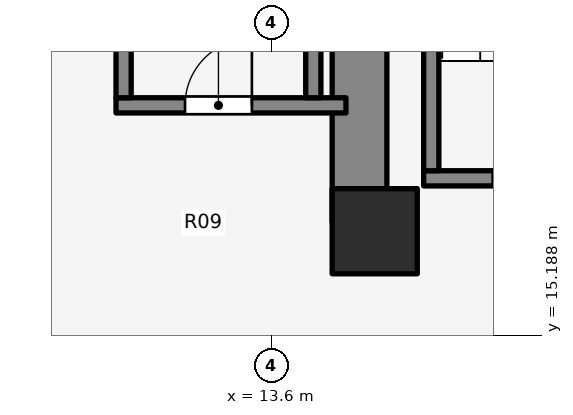
"""IFC4 building model, lengths in metres.
Left out: names, types, materials, properties, quantities, classifications, styles, units other than length and angle.
Written with IfcOpenShell. Run it as: python <this file> out.ifc"""

import sys

from ifc_helpers import new_model, si_unit, direction, frame, frame_2d, origin, origin_2d, place, context, subcontext, project, spatial, rectangle, extrude, element, fill, save


model = new_model("IFC4")
c1 = context("Model", 3, precision=1e-05, world=origin(), true_north=direction((0.0, 1.0)))
c2 = subcontext(c1, "Body", "Model", "MODEL_VIEW")
j1 = project(units=[si_unit("LENGTHUNIT", "METRE"), si_unit("PLANEANGLEUNIT", "RADIAN")], contexts=[c1])
p1 = place(None, origin())
s1 = spatial("IfcSite", under=j1, at=p1, CompositionType="ELEMENT")
p2 = place(p1, origin())
s2 = spatial("IfcBuilding", under=s1, at=p2, CompositionType="ELEMENT")
p3 = place(p2, frame((0.0, 0.0, 69.0)))
s3 = spatial("IfcBuildingStorey", under=s2, at=p3, CompositionType="ELEMENT", Elevation=69.0)
p4 = place(p3, frame((15.05, 17.05, 0.0), z_axis=(0.0, 0.0, 1.0), x_axis=(0.0, 1.0, 0.0)))
e1 = element("IfcWall", 1, at=p4, inside=s3, PredefinedType="SHEAR", context=c2, shape_type="SweptSolid", body=[
    extrude(rectangle(XDim=12.8, YDim=0.9, at=frame_2d((6.4, 0.0))), origin(), (0.0, 0.0, 1.0), 4.2),
])
p5 = place(p3, frame((16.105, 17.77, 0.0), z_axis=(0.0, 0.0, 1.0), x_axis=(1.0, 0.0, 0.0)))
e2 = element("IfcWall", 2, at=p5, inside=s3, PredefinedType="SOLIDWALL", context=c2, shape_type="SweptSolid", body=[
    extrude(rectangle(XDim=3.37, YDim=0.25, at=frame_2d((1.685, 0.0))), origin(), (0.0, 0.0, 1.0), 4.2),
])
p6 = place(p5, frame((1.135, 0.0, 0.0)))
e3 = element("IfcOpeningElement", 3, at=p6, cuts=e2, PredefinedType="OPENING", context=c2, shape_type="SweptSolid", body=[
    extrude(rectangle(XDim=1.1, YDim=2.1, at=frame_2d((0.55, 1.05))), frame((0.0, 0.135, 0.0), z_axis=(0.0, -1.0, 0.0), x_axis=(1.0, 0.0, 0.0)), (0.0, 0.0, 1.0), 0.27),
])
p7 = place(p3, frame((16.23, 17.895, 0.0), z_axis=(0.0, 0.0, 1.0), x_axis=(0.0, 1.0, 0.0)))
e4 = element("IfcWall", 4, at=p7, inside=s3, PredefinedType="SOLIDWALL", context=c2, shape_type="SweptSolid", body=[
    extrude(rectangle(XDim=7.81, YDim=0.25, at=frame_2d((3.905, 0.0))), origin(), (0.0, 0.0, 1.0), 4.2),
])
p8 = place(p3, frame((11.045, 18.97, 0.0), z_axis=(0.0, 0.0, 1.0), x_axis=(1.0, 0.0, 0.0)))
e5 = element("IfcWall", 5, at=p8, inside=s3, PredefinedType="SOLIDWALL", context=c2, shape_type="SweptSolid", body=[
    extrude(rectangle(XDim=3.782, YDim=0.25, at=frame_2d((1.891, 0.0))), origin(), (0.0, 0.0, 1.0), 4.2),
])
p9 = place(p8, frame((1.135, 0.0, 0.0)))
e6 = element("IfcOpeningElement", 6, at=p9, cuts=e5, PredefinedType="OPENING", context=c2, shape_type="SweptSolid", body=[
    extrude(rectangle(XDim=1.1, YDim=2.1, at=frame_2d((0.55, 1.05))), frame((0.0, 0.135, 0.0), z_axis=(0.0, -1.0, 0.0), x_axis=(1.0, 0.0, 0.0)), (0.0, 0.0, 1.0), 0.27),
])
for number, where, z_axis, x_axis in (
    (7, (11.17, 19.095, 0.0), (0.0, 0.0, 1.0), (0.0, 1.0, 0.0)),
    (8, (14.29, 19.095, 0.0), (0.0, 0.0, 1.0), (0.0, 1.0, 0.0)),
):
    element("IfcWall", number, at=place(p3, frame(where, z_axis=z_axis, x_axis=x_axis)), inside=s3, PredefinedType="SOLIDWALL", context=c2, shape_type="SweptSolid", body=[
        extrude(rectangle(XDim=7.81, YDim=0.25, at=frame_2d((3.905, 0.0))), origin(), (0.0, 0.0, 1.0), 4.2),
    ])
p10 = place(p3, frame((15.3, 16.9, 0.0), z_axis=(0.0, 0.0, 1.0), x_axis=(1.0, 0.0, 0.0)))
e9 = element("IfcColumn", 9, at=p10, inside=s3, PredefinedType="COLUMN", context=c2, shape_type="SweptSolid", body=[
    extrude(rectangle(XDim=1.4, YDim=1.4, at=origin_2d()), origin(), (0.0, 0.0, 1.0), 4.2),
])
p11 = place(p6, origin())
e10 = element("IfcDoor", 10, at=p11, inside=s3, OperationType="SINGLE_SWING_RIGHT", PredefinedType="DOOR", context=c2, shape_type="SweptSolid", body=[
    extrude(rectangle(XDim=1.1, YDim=2.1, at=frame_2d((0.55, 1.05))), frame((0.0, 0.025, 0.0), z_axis=(0.0, -1.0, 0.0), x_axis=(1.0, 0.0, 0.0)), (0.0, 0.0, 1.0), 0.05),
])
fill(e3, e10)
p12 = place(p9, origin())
e11 = element("IfcDoor", 11, at=p12, inside=s3, OperationType="SINGLE_SWING_RIGHT", PredefinedType="DOOR", context=c2, shape_type="SweptSolid", body=[
    extrude(rectangle(XDim=1.1, YDim=2.1, at=frame_2d((0.55, 1.05))), frame((0.0, 0.025, 0.0), z_axis=(0.0, -1.0, 0.0), x_axis=(1.0, 0.0, 0.0)), (0.0, 0.0, 1.0), 0.05),
])
fill(e6, e11)
save(model, sys.argv[1])
